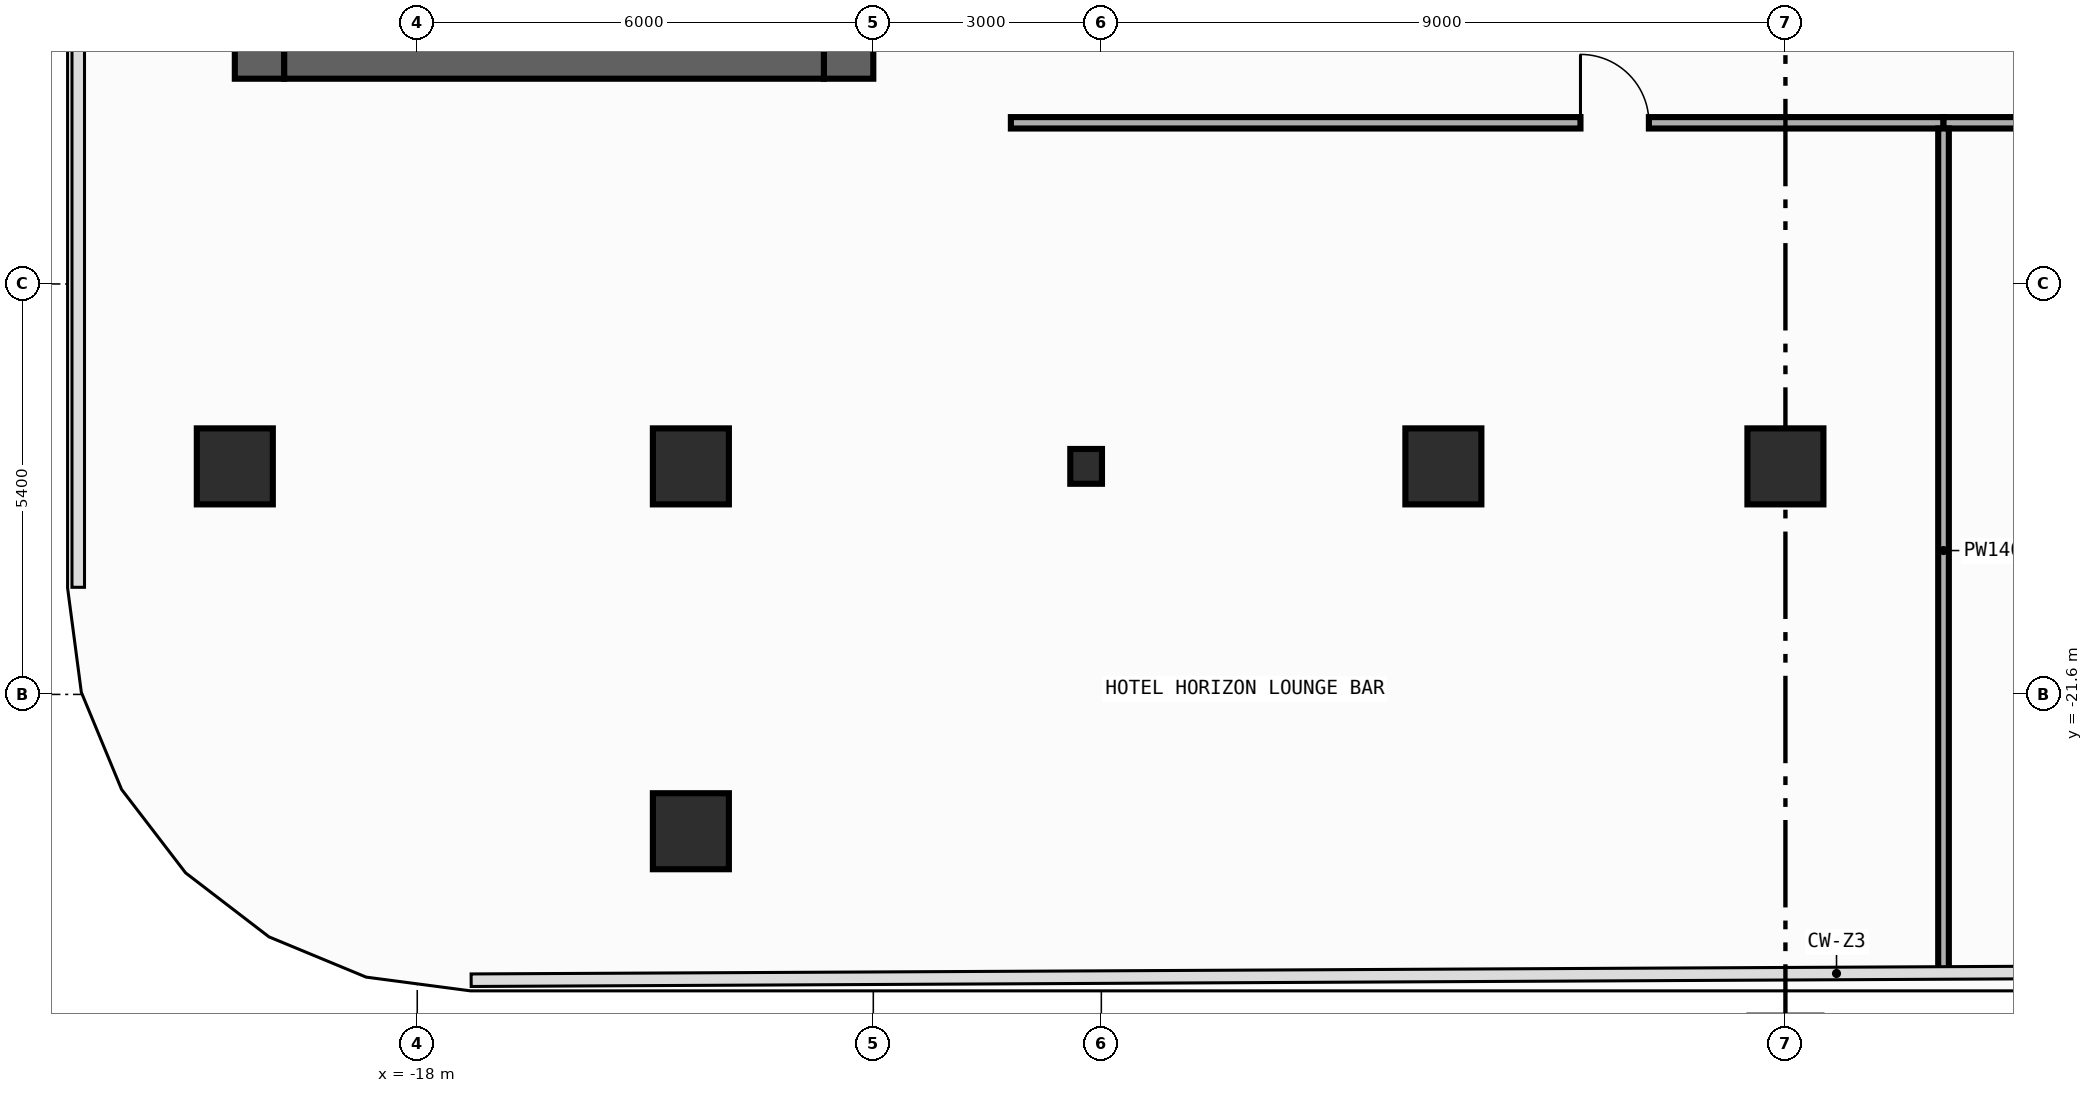
"""IFC4 building model, lengths in metres.
Left out: names, types, materials, properties, quantities, classifications, styles, units other than length and angle.
Written with IfcOpenShell. Run it as: python <this file> out.ifc"""

import sys

from ifc_helpers import new_model, si_unit, direction, frame, frame_2d, origin, origin_2d, place, context, subcontext, project, spatial, rectangle, i_section, extrude, element, fill, save


model = new_model("IFC4")
c1 = context("Model", 3, precision=1e-05, world=origin(), true_north=direction((0.0, 1.0)))
c2 = subcontext(c1, "Body", "Model", "MODEL_VIEW")
j1 = project(units=[si_unit("LENGTHUNIT", "METRE"), si_unit("PLANEANGLEUNIT", "RADIAN")], contexts=[c1])
p1 = place(None, origin())
s1 = spatial("IfcSite", under=j1, at=p1, CompositionType="ELEMENT")
p2 = place(p1, origin())
s2 = spatial("IfcBuilding", under=s1, at=p2, CompositionType="ELEMENT")
p3 = place(p2, frame((0.0, 0.0, 160.4)))
s3 = spatial("IfcBuildingStorey", under=s2, at=p3, CompositionType="ELEMENT", Elevation=160.4)
p4 = place(p3, frame((-20.075, -13.5, 0.0), z_axis=(0.0, 0.0, 1.0), x_axis=(0.0, 1.0, 0.0)))
e1 = element("IfcWall", 1, at=p4, inside=s3, PredefinedType="SHEAR", context=c2, shape_type="SweptSolid", body=[
    extrude(rectangle(XDim=27.0, YDim=0.65, at=frame_2d((13.5, 0.0))), origin(), (0.0, 0.0, 1.0), 4.34),
])
p5 = place(p3, frame((-12.325, -13.5, 0.0), z_axis=(0.0, 0.0, 1.0), x_axis=(0.0, 1.0, 0.0)))
e2 = element("IfcWall", 2, at=p5, inside=s3, PredefinedType="SHEAR", context=c2, shape_type="SweptSolid", body=[
    extrude(rectangle(XDim=27.0, YDim=0.65, at=frame_2d((13.5, 0.0))), origin(), (0.0, 0.0, 1.0), 4.34),
])
p6 = place(p5, frame((10.35, 0.0, 0.0)))
e3 = element("IfcOpeningElement", 3, at=p6, cuts=e2, PredefinedType="OPENING", context=c2, shape_type="SweptSolid", body=[
    extrude(rectangle(XDim=1.1, YDim=2.2, at=frame_2d((0.55, 1.1))), frame((0.0, 0.335, 0.0), z_axis=(0.0, -1.0, 0.0), x_axis=(1.0, 0.0, 0.0)), (0.0, 0.0, 1.0), 0.67),
])
p7 = place(p5, frame((7.15, 0.0, 0.0)))
e4 = element("IfcOpeningElement", 4, at=p7, cuts=e2, PredefinedType="OPENING", context=c2, shape_type="SweptSolid", body=[
    extrude(rectangle(XDim=1.1, YDim=2.2, at=frame_2d((0.55, 1.1))), frame((0.0, 0.335, 0.0), z_axis=(0.0, -1.0, 0.0), x_axis=(1.0, 0.0, 0.0)), (0.0, 0.0, 1.0), 0.67),
])
p8 = place(p5, frame((3.95, 0.0, 0.0)))
e5 = element("IfcOpeningElement", 5, at=p8, cuts=e2, PredefinedType="OPENING", context=c2, shape_type="SweptSolid", body=[
    extrude(rectangle(XDim=1.1, YDim=2.2, at=frame_2d((0.55, 1.1))), frame((0.0, 0.335, 0.0), z_axis=(0.0, -1.0, 0.0), x_axis=(1.0, 0.0, 0.0)), (0.0, 0.0, 1.0), 0.67),
])
p9 = place(p5, frame((15.175, 0.0, 0.0)))
e6 = element("IfcOpeningElement", 6, at=p9, cuts=e2, PredefinedType="OPENING", context=c2, shape_type="SweptSolid", body=[
    extrude(rectangle(XDim=0.85, YDim=2.1, at=frame_2d((0.425, 1.05))), frame((0.0, 0.335, 0.0), z_axis=(0.0, -1.0, 0.0), x_axis=(1.0, 0.0, 0.0)), (0.0, 0.0, 1.0), 0.67),
])
p10 = place(p5, frame((21.275, 0.0, 0.0)))
e7 = element("IfcOpeningElement", 7, at=p10, cuts=e2, PredefinedType="OPENING", context=c2, shape_type="SweptSolid", body=[
    extrude(rectangle(XDim=0.85, YDim=2.1, at=frame_2d((0.425, 1.05))), frame((0.0, 0.335, 0.0), z_axis=(0.0, -1.0, 0.0), x_axis=(1.0, 0.0, 0.0)), (0.0, 0.0, 1.0), 0.67),
])
p11 = place(p5, frame((12.725, 0.0, 0.0)))
e8 = element("IfcOpeningElement", 8, at=p11, cuts=e2, PredefinedType="OPENING", context=c2, shape_type="SweptSolid", body=[
    extrude(rectangle(XDim=1.15, YDim=2.2, at=frame_2d((0.575, 1.1))), frame((0.0, 0.335, 0.0), z_axis=(0.0, -1.0, 0.0), x_axis=(1.0, 0.0, 0.0)), (0.0, 0.0, 1.0), 0.67),
])
p12 = place(p5, frame((1.625, 0.0, 0.0)))
e9 = element("IfcOpeningElement", 9, at=p12, cuts=e2, PredefinedType="OPENING", context=c2, shape_type="SweptSolid", body=[
    extrude(rectangle(XDim=0.85, YDim=2.1, at=frame_2d((0.425, 1.05))), frame((0.0, 0.335, 0.0), z_axis=(0.0, -1.0, 0.0), x_axis=(1.0, 0.0, 0.0)), (0.0, 0.0, 1.0), 0.67),
])
p13 = place(p3, frame((-19.75, -13.175, 0.0), z_axis=(0.0, 0.0, 1.0), x_axis=(1.0, 0.0, 0.0)))
e10 = element("IfcWall", 10, at=p13, inside=s3, PredefinedType="SHEAR", context=c2, shape_type="SweptSolid", body=[
    extrude(rectangle(XDim=7.1, YDim=0.65, at=frame_2d((3.55, 0.0))), origin(), (0.0, 0.0, 1.0), 4.34),
])
p14 = place(p3, frame((-9.2, -18.6, 0.0), z_axis=(0.0, 0.0, 1.0), x_axis=(1.0, 0.0, 0.0)))
e11 = element("IfcColumn", 11, at=p14, inside=s3, PredefinedType="COLUMN", context=c2, shape_type="SweptSolid", body=[
    extrude(i_section(OverallWidth=0.417, OverallDepth=0.458, WebThickness=0.03, FlangeThickness=0.05, FilletRadius=0.022, at=origin_2d()), origin(), (0.0, 0.0, 1.0), 4.6),
])
for number, where, z_axis, x_axis in (
    (12, (-20.4, -18.6, 0.0), (0.0, 0.0, 1.0), (1.0, 0.0, 0.0)),
    (13, (-14.4, -18.6, 0.0), (0.0, 0.0, 1.0), (1.0, 0.0, 0.0)),
    (14, (-4.5, -18.6, 0.0), (0.0, 0.0, 1.0), (1.0, 0.0, 0.0)),
    (15, (0.0, -18.6, 0.0), (0.0, 0.0, 1.0), (1.0, 0.0, 0.0)),
    (16, (-14.4, -23.4, 0.0), (0.0, 0.0, 1.0), (1.0, 0.0, 0.0)),
):
    element("IfcColumn", number, at=place(p3, frame(where, z_axis=z_axis, x_axis=x_axis)), inside=s3, PredefinedType="COLUMN", context=c2, shape_type="SweptSolid", body=[
        extrude(rectangle(XDim=1.0, YDim=1.0, at=origin_2d()), origin(), (0.0, 0.0, 1.0), 4.6),
    ])
p15 = place(p3, frame((-10.19, -14.08, 0.0), z_axis=(0.0, 0.0, 1.0), x_axis=(1.0, 0.0, 0.0)))
e17 = element("IfcWall", 17, at=p15, inside=s3, PredefinedType="PARTITIONING", context=c2, shape_type="SweptSolid", body=[
    extrude(rectangle(XDim=12.27, YDim=0.15, at=frame_2d((6.135, 0.0))), origin(), (0.0, 0.0, 1.0), 4.34),
])
p16 = place(p15, frame((7.494, 0.0, 0.0)))
e18 = element("IfcOpeningElement", 18, at=p16, cuts=e17, PredefinedType="OPENING", context=c2, shape_type="SweptSolid", body=[
    extrude(rectangle(XDim=0.9, YDim=2.15, at=frame_2d((0.45, 1.075))), frame((0.0, 0.085, 0.0), z_axis=(0.0, -1.0, 0.0), x_axis=(1.0, 0.0, 0.0)), (0.0, 0.0, 1.0), 0.17),
])
p17 = place(p3, frame((2.08, -14.08, 0.0), z_axis=(0.0, 0.0, 1.0), x_axis=(1.0, 0.0, 0.0)))
e19 = element("IfcWall", 19, at=p17, inside=s3, PredefinedType="PARTITIONING", context=c2, shape_type="SweptSolid", body=[
    extrude(rectangle(XDim=7.28, YDim=0.15, at=frame_2d((3.64, 0.0))), origin(), (0.0, 0.0, 1.0), 4.34),
])
p18 = place(p17, frame((3.493, 0.0, 0.0)))
e20 = element("IfcOpeningElement", 20, at=p18, cuts=e19, PredefinedType="OPENING", context=c2, shape_type="SweptSolid", body=[
    extrude(rectangle(XDim=0.9, YDim=2.15, at=frame_2d((0.45, 1.075))), frame((0.0, 0.085, 0.0), z_axis=(0.0, -1.0, 0.0), x_axis=(1.0, 0.0, 0.0)), (0.0, 0.0, 1.0), 0.17),
])
p19 = place(p3, frame((2.08, -25.26, 0.0), z_axis=(0.0, 0.0, 1.0), x_axis=(0.0, 1.0, 0.0)))
e21 = element("IfcWall", 21, at=p19, inside=s3, PredefinedType="PARTITIONING", context=c2, shape_type="SweptSolid", body=[
    extrude(rectangle(XDim=11.104, YDim=0.14, at=frame_2d((5.552, 0.0))), origin(), (0.0, 0.0, 1.0), 4.34),
])
p20 = place(p16, origin())
e22 = element("IfcDoor", 22, at=p20, inside=s3, OperationType="SINGLE_SWING_LEFT", PredefinedType="DOOR", context=c2, shape_type="SweptSolid", body=[
    extrude(rectangle(XDim=0.9, YDim=2.15, at=frame_2d((0.45, 1.075))), frame((0.0, 0.025, 0.0), z_axis=(0.0, -1.0, 0.0), x_axis=(1.0, 0.0, 0.0)), (0.0, 0.0, 1.0), 0.05),
])
fill(e18, e22)
save(model, sys.argv[1])
